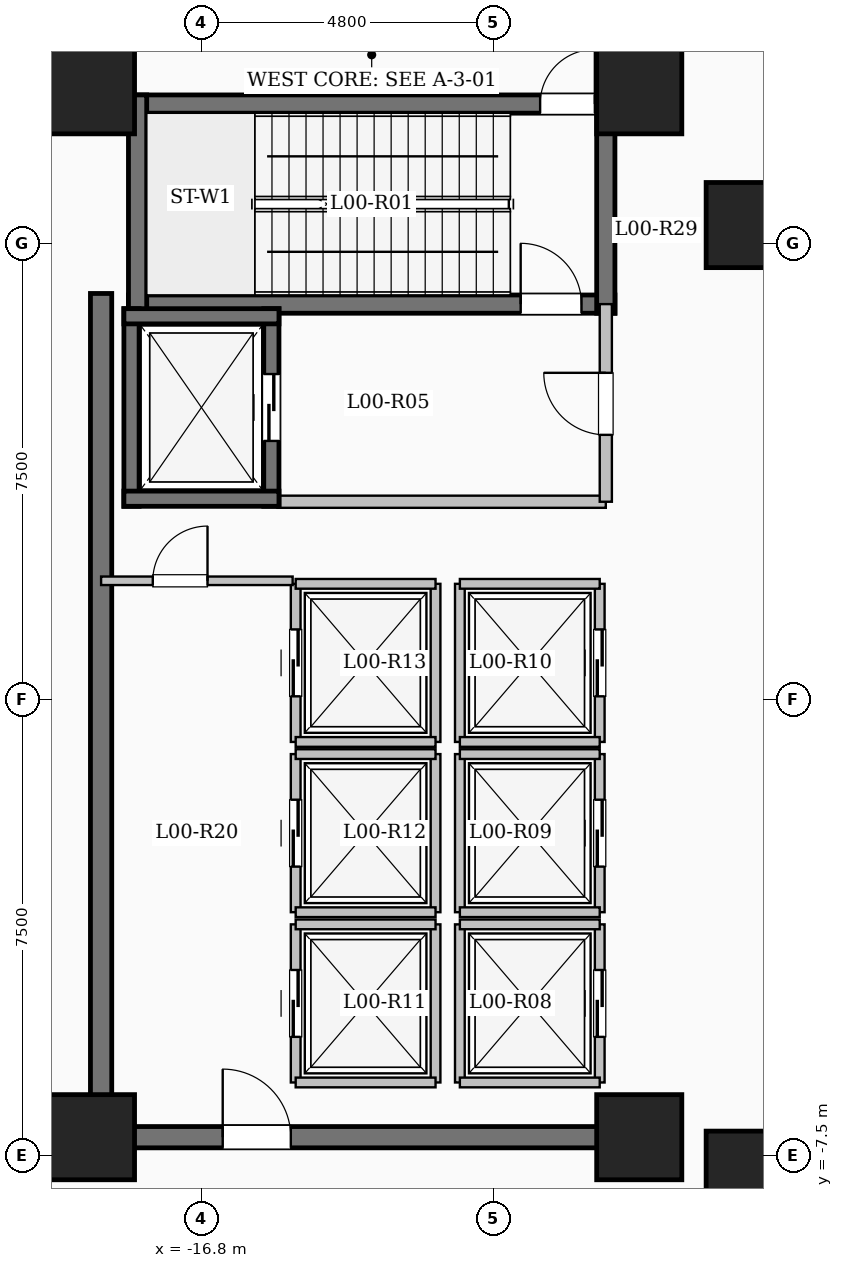
"""IFC4 building model, lengths in metres.
Left out: names, types, materials, properties, quantities, classifications, styles, units other than length and angle.
Written with IfcOpenShell. Run it as: python <this file> out.ifc"""

import sys

from ifc_helpers import new_model, si_unit, direction, frame, frame_2d, origin, origin_2d, place, context, subcontext, project, spatial, rectangle, extrude, element, fill, save


model = new_model("IFC4")
c1 = context("Model", 3, precision=1e-05, world=origin(), true_north=direction((0.0, 1.0)))
c2 = subcontext(c1, "Body", "Model", "MODEL_VIEW")
j1 = project(units=[si_unit("LENGTHUNIT", "METRE"), si_unit("PLANEANGLEUNIT", "RADIAN")], contexts=[c1])
p1 = place(None, origin())
s1 = spatial("IfcSite", under=j1, at=p1, CompositionType="ELEMENT")
p2 = place(p1, origin())
s2 = spatial("IfcBuilding", under=s1, at=p2, CompositionType="ELEMENT")
p3 = place(p2, origin())
s3 = spatial("IfcBuildingStorey", under=s2, at=p3, CompositionType="ELEMENT", Elevation=0.0)
for number, where, z_axis, x_axis in (
    (1, (-7.8, -7.8, 0.0), (0.0, 0.0, 1.0), (1.0, 0.0, 0.0)),
    (2, (-7.8, 7.8, 0.0), (0.0, 0.0, 1.0), (1.0, 0.0, 0.0)),
    (3, (-9.6, -7.2, 0.0), (0.0, 0.0, 1.0), (1.0, 0.0, 0.0)),
    (4, (-9.6, 10.0, 0.0), (0.0, 0.0, 1.0), (1.0, 0.0, 0.0)),
    (5, (-18.6, -7.2, 0.0), (0.0, 0.0, 1.0), (1.0, 0.0, 0.0)),
    (6, (-18.6, 10.0, 0.0), (0.0, 0.0, 1.0), (1.0, 0.0, 0.0)),
):
    element("IfcColumn", number, at=place(p3, frame(where, z_axis=z_axis, x_axis=x_axis)), inside=s3, PredefinedType="COLUMN", context=c2, shape_type="SweptSolid", body=[
        extrude(rectangle(XDim=1.4, YDim=1.4, at=origin_2d()), origin(), (0.0, 0.0, 1.0), 5.4),
    ])
p4 = place(p3, frame((-18.0, 9.79, 0.0), z_axis=(0.0, 0.0, 1.0), x_axis=(1.0, 0.0, 0.0)))
e7 = element("IfcWall", 7, at=p4, inside=s3, PredefinedType="SHEAR", context=c2, shape_type="SweptSolid", body=[
    extrude(rectangle(XDim=8.0, YDim=0.3, at=frame_2d((4.0, 0.0))), origin(), (0.0, 0.0, 1.0), 5.4),
])
p5 = place(p4, frame((6.77, 0.0, 0.0)))
e8 = element("IfcOpeningElement", 8, at=p5, cuts=e7, PredefinedType="OPENING", context=c2, shape_type="SweptSolid", body=[
    extrude(rectangle(XDim=0.9, YDim=2.15, at=frame_2d((0.45, 1.075))), frame((0.0, 0.16, 0.0), z_axis=(0.0, -1.0, 0.0), x_axis=(1.0, 0.0, 0.0)), (0.0, 0.0, 1.0), 0.32),
])
p6 = place(p3, frame((-18.0, 6.5, 0.0), z_axis=(0.0, 0.0, 1.0), x_axis=(1.0, 0.0, 0.0)))
e9 = element("IfcWall", 9, at=p6, inside=s3, PredefinedType="SHEAR", context=c2, shape_type="SweptSolid", body=[
    extrude(rectangle(XDim=8.0, YDim=0.3, at=frame_2d((4.0, 0.0))), origin(), (0.0, 0.0, 1.0), 5.4),
])
p7 = place(p6, frame((6.45, 0.0, 0.0)))
e10 = element("IfcOpeningElement", 10, at=p7, cuts=e9, PredefinedType="OPENING", context=c2, shape_type="SweptSolid", body=[
    extrude(rectangle(XDim=1.0, YDim=2.15, at=frame_2d((0.5, 1.075))), frame((0.0, 0.16, 0.0), z_axis=(0.0, -1.0, 0.0), x_axis=(1.0, 0.0, 0.0)), (0.0, 0.0, 1.0), 0.32),
])
for number, where, z_axis, x_axis in (
    (11, (-17.85, 6.35, 0.0), (0.0, 0.0, 1.0), (0.0, 1.0, 0.0)),
    (12, (-10.15, 6.35, 0.0), (0.0, 0.0, 1.0), (0.0, 1.0, 0.0)),
):
    element("IfcWall", number, at=place(p3, frame(where, z_axis=z_axis, x_axis=x_axis)), inside=s3, PredefinedType="SHEAR", context=c2, shape_type="SweptSolid", body=[
        extrude(rectangle(XDim=3.59, YDim=0.3, at=frame_2d((1.795, 0.0))), origin(), (0.0, 0.0, 1.0), 5.4),
    ])
p8 = place(p3, frame((-15.55, 3.25, 0.0), z_axis=(0.0, 0.0, 1.0), x_axis=(1.0, 0.0, 0.0)))
e13 = element("IfcWall", 13, at=p8, inside=s3, PredefinedType="SOLIDWALL", context=c2, shape_type="SweptSolid", body=[
    extrude(rectangle(XDim=5.4, YDim=0.2, at=frame_2d((2.7, 0.0))), origin(), (0.0, 0.0, 1.0), 5.1),
])
p9 = place(p3, frame((-10.15, 3.25, 0.0), z_axis=(0.0, 0.0, 1.0), x_axis=(0.0, 1.0, 0.0)))
e14 = element("IfcWall", 14, at=p9, inside=s3, PredefinedType="SOLIDWALL", context=c2, shape_type="SweptSolid", body=[
    extrude(rectangle(XDim=3.25, YDim=0.2, at=frame_2d((1.625, 0.0))), origin(), (0.0, 0.0, 1.0), 5.1),
])
p10 = place(p9, frame((1.1, 0.0, 0.0)))
e15 = element("IfcOpeningElement", 15, at=p10, cuts=e14, PredefinedType="OPENING", context=c2, shape_type="SweptSolid", body=[
    extrude(rectangle(XDim=1.02, YDim=2.15, at=frame_2d((0.51, 1.075))), frame((0.0, 0.11, 0.0), z_axis=(0.0, -1.0, 0.0), x_axis=(1.0, 0.0, 0.0)), (0.0, 0.0, 1.0), 0.22),
])
p11 = place(p3, frame((-17.95, 3.175, 0.0), z_axis=(0.0, 0.0, 1.0), x_axis=(0.0, 1.0, 0.0)))
e16 = element("IfcWall", 16, at=p11, inside=s3, PredefinedType="SHEAR", context=c2, shape_type="SweptSolid", body=[
    extrude(rectangle(XDim=3.25, YDim=0.25, at=frame_2d((1.625, 0.0))), origin(), (0.0, 0.0, 1.0), 5.4),
])
p12 = place(p3, frame((-15.65, 3.175, 0.0), z_axis=(0.0, 0.0, 1.0), x_axis=(0.0, 1.0, 0.0)))
e17 = element("IfcWall", 17, at=p12, inside=s3, PredefinedType="SHEAR", context=c2, shape_type="SweptSolid", body=[
    extrude(rectangle(XDim=3.25, YDim=0.25, at=frame_2d((1.625, 0.0))), origin(), (0.0, 0.0, 1.0), 5.4),
])
p13 = place(p12, frame((1.075, 0.0, 0.0)))
e18 = element("IfcOpeningElement", 18, at=p13, cuts=e17, PredefinedType="OPENING", context=c2, shape_type="SweptSolid", body=[
    extrude(rectangle(XDim=1.1, YDim=2.15, at=frame_2d((0.55, 1.075))), frame((0.0, 0.135, 0.0), z_axis=(0.0, -1.0, 0.0), x_axis=(1.0, 0.0, 0.0)), (0.0, 0.0, 1.0), 0.27),
])
for number, where, z_axis, x_axis in (
    (19, (-18.075, 3.3, 0.0), (0.0, 0.0, 1.0), (1.0, 0.0, 0.0)),
    (20, (-18.075, 6.3, 0.0), (0.0, 0.0, 1.0), (1.0, 0.0, 0.0)),
):
    element("IfcWall", number, at=place(p3, frame(where, z_axis=z_axis, x_axis=x_axis)), inside=s3, PredefinedType="SHEAR", context=c2, shape_type="SweptSolid", body=[
        extrude(rectangle(XDim=2.55, YDim=0.25, at=frame_2d((1.275, 0.0))), origin(), (0.0, 0.0, 1.0), 5.4),
    ])
p14 = place(p3, frame((-12.55, -6.3, 0.0), z_axis=(0.0, 0.0, 1.0), x_axis=(0.0, 1.0, 0.0)))
e21 = element("IfcWall", 21, at=p14, inside=s3, PredefinedType="SOLIDWALL", context=c2, shape_type="SweptSolid", body=[
    extrude(rectangle(XDim=2.6, YDim=0.16, at=frame_2d((1.3, 0.0))), origin(), (0.0, 0.0, 1.0), 5.1),
])
p15 = place(p3, frame((-10.25, -6.3, 0.0), z_axis=(0.0, 0.0, 1.0), x_axis=(0.0, 1.0, 0.0)))
e22 = element("IfcWall", 22, at=p15, inside=s3, PredefinedType="SOLIDWALL", context=c2, shape_type="SweptSolid", body=[
    extrude(rectangle(XDim=2.6, YDim=0.16, at=frame_2d((1.3, 0.0))), origin(), (0.0, 0.0, 1.0), 5.1),
])
p16 = place(p15, frame((0.75, 0.0, 0.0)))
e23 = element("IfcOpeningElement", 23, at=p16, cuts=e22, PredefinedType="OPENING", context=c2, shape_type="SweptSolid", body=[
    extrude(rectangle(XDim=1.1, YDim=2.15, at=frame_2d((0.55, 1.075))), frame((0.0, 0.09, 0.0), z_axis=(0.0, -1.0, 0.0), x_axis=(1.0, 0.0, 0.0)), (0.0, 0.0, 1.0), 0.18),
])
for number, where, z_axis, x_axis in (
    (24, (-12.55, -6.3, 0.0), (0.0, 0.0, 1.0), (1.0, 0.0, 0.0)),
    (25, (-12.55, -3.7, 0.0), (0.0, 0.0, 1.0), (1.0, 0.0, 0.0)),
):
    element("IfcWall", number, at=place(p3, frame(where, z_axis=z_axis, x_axis=x_axis)), inside=s3, PredefinedType="SOLIDWALL", context=c2, shape_type="SweptSolid", body=[
        extrude(rectangle(XDim=2.3, YDim=0.16, at=frame_2d((1.15, 0.0))), origin(), (0.0, 0.0, 1.0), 5.1),
    ])
p17 = place(p3, frame((-12.55, -3.5, 0.0), z_axis=(0.0, 0.0, 1.0), x_axis=(0.0, 1.0, 0.0)))
e26 = element("IfcWall", 26, at=p17, inside=s3, PredefinedType="SOLIDWALL", context=c2, shape_type="SweptSolid", body=[
    extrude(rectangle(XDim=2.6, YDim=0.16, at=frame_2d((1.3, 0.0))), origin(), (0.0, 0.0, 1.0), 5.1),
])
p18 = place(p3, frame((-10.25, -3.5, 0.0), z_axis=(0.0, 0.0, 1.0), x_axis=(0.0, 1.0, 0.0)))
e27 = element("IfcWall", 27, at=p18, inside=s3, PredefinedType="SOLIDWALL", context=c2, shape_type="SweptSolid", body=[
    extrude(rectangle(XDim=2.6, YDim=0.16, at=frame_2d((1.3, 0.0))), origin(), (0.0, 0.0, 1.0), 5.1),
])
p19 = place(p18, frame((0.75, 0.0, 0.0)))
e28 = element("IfcOpeningElement", 28, at=p19, cuts=e27, PredefinedType="OPENING", context=c2, shape_type="SweptSolid", body=[
    extrude(rectangle(XDim=1.1, YDim=2.15, at=frame_2d((0.55, 1.075))), frame((0.0, 0.09, 0.0), z_axis=(0.0, -1.0, 0.0), x_axis=(1.0, 0.0, 0.0)), (0.0, 0.0, 1.0), 0.18),
])
for number, where, z_axis, x_axis in (
    (29, (-12.55, -3.5, 0.0), (0.0, 0.0, 1.0), (1.0, 0.0, 0.0)),
    (30, (-12.55, -0.9, 0.0), (0.0, 0.0, 1.0), (1.0, 0.0, 0.0)),
):
    element("IfcWall", number, at=place(p3, frame(where, z_axis=z_axis, x_axis=x_axis)), inside=s3, PredefinedType="SOLIDWALL", context=c2, shape_type="SweptSolid", body=[
        extrude(rectangle(XDim=2.3, YDim=0.16, at=frame_2d((1.15, 0.0))), origin(), (0.0, 0.0, 1.0), 5.1),
    ])
p20 = place(p3, frame((-12.55, -0.7, 0.0), z_axis=(0.0, 0.0, 1.0), x_axis=(0.0, 1.0, 0.0)))
e31 = element("IfcWall", 31, at=p20, inside=s3, PredefinedType="SOLIDWALL", context=c2, shape_type="SweptSolid", body=[
    extrude(rectangle(XDim=2.6, YDim=0.16, at=frame_2d((1.3, 0.0))), origin(), (0.0, 0.0, 1.0), 5.1),
])
p21 = place(p3, frame((-10.25, -0.7, 0.0), z_axis=(0.0, 0.0, 1.0), x_axis=(0.0, 1.0, 0.0)))
e32 = element("IfcWall", 32, at=p21, inside=s3, PredefinedType="SOLIDWALL", context=c2, shape_type="SweptSolid", body=[
    extrude(rectangle(XDim=2.6, YDim=0.16, at=frame_2d((1.3, 0.0))), origin(), (0.0, 0.0, 1.0), 5.1),
])
p22 = place(p21, frame((0.75, 0.0, 0.0)))
e33 = element("IfcOpeningElement", 33, at=p22, cuts=e32, PredefinedType="OPENING", context=c2, shape_type="SweptSolid", body=[
    extrude(rectangle(XDim=1.1, YDim=2.15, at=frame_2d((0.55, 1.075))), frame((0.0, 0.09, 0.0), z_axis=(0.0, -1.0, 0.0), x_axis=(1.0, 0.0, 0.0)), (0.0, 0.0, 1.0), 0.18),
])
for number, where, z_axis, x_axis in (
    (34, (-12.55, -0.7, 0.0), (0.0, 0.0, 1.0), (1.0, 0.0, 0.0)),
    (35, (-12.55, 1.9, 0.0), (0.0, 0.0, 1.0), (1.0, 0.0, 0.0)),
):
    element("IfcWall", number, at=place(p3, frame(where, z_axis=z_axis, x_axis=x_axis)), inside=s3, PredefinedType="SOLIDWALL", context=c2, shape_type="SweptSolid", body=[
        extrude(rectangle(XDim=2.3, YDim=0.16, at=frame_2d((1.15, 0.0))), origin(), (0.0, 0.0, 1.0), 5.1),
    ])
p23 = place(p3, frame((-15.25, -6.3, 0.0), z_axis=(0.0, 0.0, 1.0), x_axis=(0.0, 1.0, 0.0)))
e36 = element("IfcWall", 36, at=p23, inside=s3, PredefinedType="SOLIDWALL", context=c2, shape_type="SweptSolid", body=[
    extrude(rectangle(XDim=2.6, YDim=0.16, at=frame_2d((1.3, 0.0))), origin(), (0.0, 0.0, 1.0), 5.1),
])
p24 = place(p23, frame((0.75, 0.0, 0.0)))
e37 = element("IfcOpeningElement", 37, at=p24, cuts=e36, PredefinedType="OPENING", context=c2, shape_type="SweptSolid", body=[
    extrude(rectangle(XDim=1.1, YDim=2.15, at=frame_2d((0.55, 1.075))), frame((0.0, 0.09, 0.0), z_axis=(0.0, -1.0, 0.0), x_axis=(1.0, 0.0, 0.0)), (0.0, 0.0, 1.0), 0.18),
])
p25 = place(p3, frame((-12.95, -6.3, 0.0), z_axis=(0.0, 0.0, 1.0), x_axis=(0.0, 1.0, 0.0)))
e38 = element("IfcWall", 38, at=p25, inside=s3, PredefinedType="SOLIDWALL", context=c2, shape_type="SweptSolid", body=[
    extrude(rectangle(XDim=2.6, YDim=0.16, at=frame_2d((1.3, 0.0))), origin(), (0.0, 0.0, 1.0), 5.1),
])
for number, where, z_axis, x_axis in (
    (39, (-15.25, -6.3, 0.0), (0.0, 0.0, 1.0), (1.0, 0.0, 0.0)),
    (40, (-15.25, -3.7, 0.0), (0.0, 0.0, 1.0), (1.0, 0.0, 0.0)),
):
    element("IfcWall", number, at=place(p3, frame(where, z_axis=z_axis, x_axis=x_axis)), inside=s3, PredefinedType="SOLIDWALL", context=c2, shape_type="SweptSolid", body=[
        extrude(rectangle(XDim=2.3, YDim=0.16, at=frame_2d((1.15, 0.0))), origin(), (0.0, 0.0, 1.0), 5.1),
    ])
p26 = place(p3, frame((-15.25, -3.5, 0.0), z_axis=(0.0, 0.0, 1.0), x_axis=(0.0, 1.0, 0.0)))
e41 = element("IfcWall", 41, at=p26, inside=s3, PredefinedType="SOLIDWALL", context=c2, shape_type="SweptSolid", body=[
    extrude(rectangle(XDim=2.6, YDim=0.16, at=frame_2d((1.3, 0.0))), origin(), (0.0, 0.0, 1.0), 5.1),
])
p27 = place(p26, frame((0.75, 0.0, 0.0)))
e42 = element("IfcOpeningElement", 42, at=p27, cuts=e41, PredefinedType="OPENING", context=c2, shape_type="SweptSolid", body=[
    extrude(rectangle(XDim=1.1, YDim=2.15, at=frame_2d((0.55, 1.075))), frame((0.0, 0.09, 0.0), z_axis=(0.0, -1.0, 0.0), x_axis=(1.0, 0.0, 0.0)), (0.0, 0.0, 1.0), 0.18),
])
p28 = place(p3, frame((-12.95, -3.5, 0.0), z_axis=(0.0, 0.0, 1.0), x_axis=(0.0, 1.0, 0.0)))
e43 = element("IfcWall", 43, at=p28, inside=s3, PredefinedType="SOLIDWALL", context=c2, shape_type="SweptSolid", body=[
    extrude(rectangle(XDim=2.6, YDim=0.16, at=frame_2d((1.3, 0.0))), origin(), (0.0, 0.0, 1.0), 5.1),
])
for number, where, z_axis, x_axis in (
    (44, (-15.25, -3.5, 0.0), (0.0, 0.0, 1.0), (1.0, 0.0, 0.0)),
    (45, (-15.25, -0.9, 0.0), (0.0, 0.0, 1.0), (1.0, 0.0, 0.0)),
):
    element("IfcWall", number, at=place(p3, frame(where, z_axis=z_axis, x_axis=x_axis)), inside=s3, PredefinedType="SOLIDWALL", context=c2, shape_type="SweptSolid", body=[
        extrude(rectangle(XDim=2.3, YDim=0.16, at=frame_2d((1.15, 0.0))), origin(), (0.0, 0.0, 1.0), 5.1),
    ])
p29 = place(p3, frame((-15.25, -0.7, 0.0), z_axis=(0.0, 0.0, 1.0), x_axis=(0.0, 1.0, 0.0)))
e46 = element("IfcWall", 46, at=p29, inside=s3, PredefinedType="SOLIDWALL", context=c2, shape_type="SweptSolid", body=[
    extrude(rectangle(XDim=2.6, YDim=0.16, at=frame_2d((1.3, 0.0))), origin(), (0.0, 0.0, 1.0), 5.1),
])
p30 = place(p29, frame((0.75, 0.0, 0.0)))
e47 = element("IfcOpeningElement", 47, at=p30, cuts=e46, PredefinedType="OPENING", context=c2, shape_type="SweptSolid", body=[
    extrude(rectangle(XDim=1.1, YDim=2.15, at=frame_2d((0.55, 1.075))), frame((0.0, 0.09, 0.0), z_axis=(0.0, -1.0, 0.0), x_axis=(1.0, 0.0, 0.0)), (0.0, 0.0, 1.0), 0.18),
])
p31 = place(p3, frame((-12.95, -0.7, 0.0), z_axis=(0.0, 0.0, 1.0), x_axis=(0.0, 1.0, 0.0)))
e48 = element("IfcWall", 48, at=p31, inside=s3, PredefinedType="SOLIDWALL", context=c2, shape_type="SweptSolid", body=[
    extrude(rectangle(XDim=2.6, YDim=0.16, at=frame_2d((1.3, 0.0))), origin(), (0.0, 0.0, 1.0), 5.1),
])
for number, where, z_axis, x_axis in (
    (49, (-15.25, -0.7, 0.0), (0.0, 0.0, 1.0), (1.0, 0.0, 0.0)),
    (50, (-15.25, 1.9, 0.0), (0.0, 0.0, 1.0), (1.0, 0.0, 0.0)),
):
    element("IfcWall", number, at=place(p3, frame(where, z_axis=z_axis, x_axis=x_axis)), inside=s3, PredefinedType="SOLIDWALL", context=c2, shape_type="SweptSolid", body=[
        extrude(rectangle(XDim=2.3, YDim=0.16, at=frame_2d((1.15, 0.0))), origin(), (0.0, 0.0, 1.0), 5.1),
    ])
p32 = place(p3, frame((-18.45, -7.375, 0.0), z_axis=(0.0, 0.0, 1.0), x_axis=(0.0, 1.0, 0.0)))
e51 = element("IfcWall", 51, at=p32, inside=s3, PredefinedType="SHEAR", context=c2, shape_type="SweptSolid", body=[
    extrude(rectangle(XDim=14.05, YDim=0.35, at=frame_2d((7.025, 0.0))), origin(), (0.0, 0.0, 1.0), 5.4),
])
p33 = place(p3, frame((-18.625, -7.2, 0.0), z_axis=(0.0, 0.0, 1.0), x_axis=(1.0, 0.0, 0.0)))
e52 = element("IfcWall", 52, at=p33, inside=s3, PredefinedType="SHEAR", context=c2, shape_type="SweptSolid", body=[
    extrude(rectangle(XDim=8.55, YDim=0.35, at=frame_2d((4.275, 0.0))), origin(), (0.0, 0.0, 1.0), 5.4),
])
p34 = place(p33, frame((2.175, 0.0, 0.0)))
e53 = element("IfcOpeningElement", 53, at=p34, cuts=e52, PredefinedType="OPENING", context=c2, shape_type="SweptSolid", body=[
    extrude(rectangle(XDim=1.12, YDim=2.15, at=frame_2d((0.56, 1.075))), frame((0.0, 0.185, 0.0), z_axis=(0.0, -1.0, 0.0), x_axis=(1.0, 0.0, 0.0)), (0.0, 0.0, 1.0), 0.37),
])
p35 = place(p3, frame((-18.45, 1.95, 0.0), z_axis=(0.0, 0.0, 1.0), x_axis=(1.0, 0.0, 0.0)))
e54 = element("IfcWall", 54, at=p35, inside=s3, PredefinedType="PARTITIONING", context=c2, shape_type="SweptSolid", body=[
    extrude(rectangle(XDim=3.15, YDim=0.14, at=frame_2d((1.575, 0.0))), origin(), (0.0, 0.0, 1.0), 5.1),
])
p36 = place(p35, frame((0.85, 0.0, 0.0)))
e55 = element("IfcOpeningElement", 55, at=p36, cuts=e54, PredefinedType="OPENING", context=c2, shape_type="SweptSolid", body=[
    extrude(rectangle(XDim=0.9, YDim=2.08, at=frame_2d((0.45, 1.04))), frame((0.0, 0.08, 0.0), z_axis=(0.0, -1.0, 0.0), x_axis=(1.0, 0.0, 0.0)), (0.0, 0.0, 1.0), 0.16),
])
p37 = place(p7, origin())
e56 = element("IfcDoor", 56, at=p37, inside=s3, OperationType="SINGLE_SWING_LEFT", PredefinedType="DOOR", context=c2, shape_type="SweptSolid", body=[
    extrude(rectangle(XDim=1.0, YDim=2.15, at=frame_2d((0.5, 1.075))), frame((0.0, 0.025, 0.0), z_axis=(0.0, -1.0, 0.0), x_axis=(1.0, 0.0, 0.0)), (0.0, 0.0, 1.0), 0.05),
])
fill(e10, e56)
p38 = place(p5, origin())
e57 = element("IfcDoor", 57, at=p38, inside=s3, OperationType="SINGLE_SWING_RIGHT", PredefinedType="DOOR", context=c2, shape_type="SweptSolid", body=[
    extrude(rectangle(XDim=0.9, YDim=2.15, at=frame_2d((0.45, 1.075))), frame((0.0, 0.025, 0.0), z_axis=(0.0, -1.0, 0.0), x_axis=(1.0, 0.0, 0.0)), (0.0, 0.0, 1.0), 0.05),
])
fill(e8, e57)
p39 = place(p10, origin())
e58 = element("IfcDoor", 58, at=p39, inside=s3, OperationType="SINGLE_SWING_RIGHT", PredefinedType="DOOR", context=c2, shape_type="SweptSolid", body=[
    extrude(rectangle(XDim=1.02, YDim=2.15, at=frame_2d((0.51, 1.075))), frame((0.0, 0.025, 0.0), z_axis=(0.0, -1.0, 0.0), x_axis=(1.0, 0.0, 0.0)), (0.0, 0.0, 1.0), 0.05),
])
fill(e15, e58)
p40 = place(p13, origin())
e59 = element("IfcDoor", 59, at=p40, inside=s3, OperationType="SLIDING_TO_LEFT", PredefinedType="DOOR", context=c2, shape_type="SweptSolid", body=[
    extrude(rectangle(XDim=1.1, YDim=2.15, at=frame_2d((0.55, 1.075))), frame((0.0, 0.025, 0.0), z_axis=(0.0, -1.0, 0.0), x_axis=(1.0, 0.0, 0.0)), (0.0, 0.0, 1.0), 0.05),
])
fill(e18, e59)
p41 = place(p16, origin())
e60 = element("IfcDoor", 60, at=p41, inside=s3, OperationType="SLIDING_TO_LEFT", PredefinedType="DOOR", context=c2, shape_type="SweptSolid", body=[
    extrude(rectangle(XDim=1.1, YDim=2.15, at=frame_2d((0.55, 1.075))), frame((0.0, 0.025, 0.0), z_axis=(0.0, -1.0, 0.0), x_axis=(1.0, 0.0, 0.0)), (0.0, 0.0, 1.0), 0.05),
])
fill(e23, e60)
p42 = place(p19, origin())
e61 = element("IfcDoor", 61, at=p42, inside=s3, OperationType="SLIDING_TO_LEFT", PredefinedType="DOOR", context=c2, shape_type="SweptSolid", body=[
    extrude(rectangle(XDim=1.1, YDim=2.15, at=frame_2d((0.55, 1.075))), frame((0.0, 0.025, 0.0), z_axis=(0.0, -1.0, 0.0), x_axis=(1.0, 0.0, 0.0)), (0.0, 0.0, 1.0), 0.05),
])
fill(e28, e61)
p43 = place(p22, origin())
e62 = element("IfcDoor", 62, at=p43, inside=s3, OperationType="SLIDING_TO_LEFT", PredefinedType="DOOR", context=c2, shape_type="SweptSolid", body=[
    extrude(rectangle(XDim=1.1, YDim=2.15, at=frame_2d((0.55, 1.075))), frame((0.0, 0.025, 0.0), z_axis=(0.0, -1.0, 0.0), x_axis=(1.0, 0.0, 0.0)), (0.0, 0.0, 1.0), 0.05),
])
fill(e33, e62)
p44 = place(p24, origin())
e63 = element("IfcDoor", 63, at=p44, inside=s3, OperationType="SLIDING_TO_LEFT", PredefinedType="DOOR", context=c2, shape_type="SweptSolid", body=[
    extrude(rectangle(XDim=1.1, YDim=2.15, at=frame_2d((0.55, 1.075))), frame((0.0, 0.025, 0.0), z_axis=(0.0, -1.0, 0.0), x_axis=(1.0, 0.0, 0.0)), (0.0, 0.0, 1.0), 0.05),
])
fill(e37, e63)
p45 = place(p27, origin())
e64 = element("IfcDoor", 64, at=p45, inside=s3, OperationType="SLIDING_TO_LEFT", PredefinedType="DOOR", context=c2, shape_type="SweptSolid", body=[
    extrude(rectangle(XDim=1.1, YDim=2.15, at=frame_2d((0.55, 1.075))), frame((0.0, 0.025, 0.0), z_axis=(0.0, -1.0, 0.0), x_axis=(1.0, 0.0, 0.0)), (0.0, 0.0, 1.0), 0.05),
])
fill(e42, e64)
p46 = place(p30, origin())
e65 = element("IfcDoor", 65, at=p46, inside=s3, OperationType="SLIDING_TO_LEFT", PredefinedType="DOOR", context=c2, shape_type="SweptSolid", body=[
    extrude(rectangle(XDim=1.1, YDim=2.15, at=frame_2d((0.55, 1.075))), frame((0.0, 0.025, 0.0), z_axis=(0.0, -1.0, 0.0), x_axis=(1.0, 0.0, 0.0)), (0.0, 0.0, 1.0), 0.05),
])
fill(e47, e65)
p47 = place(p34, origin())
e66 = element("IfcDoor", 66, at=p47, inside=s3, OperationType="SINGLE_SWING_LEFT", PredefinedType="DOOR", context=c2, shape_type="SweptSolid", body=[
    extrude(rectangle(XDim=1.12, YDim=2.15, at=frame_2d((0.56, 1.075))), frame((0.0, 0.025, 0.0), z_axis=(0.0, -1.0, 0.0), x_axis=(1.0, 0.0, 0.0)), (0.0, 0.0, 1.0), 0.05),
])
fill(e53, e66)
p48 = place(p36, origin())
e67 = element("IfcDoor", 67, at=p48, inside=s3, OperationType="SINGLE_SWING_RIGHT", PredefinedType="DOOR", context=c2, shape_type="SweptSolid", body=[
    extrude(rectangle(XDim=0.9, YDim=2.08, at=frame_2d((0.45, 1.04))), frame((0.0, 0.025, 0.0), z_axis=(0.0, -1.0, 0.0), x_axis=(1.0, 0.0, 0.0)), (0.0, 0.0, 1.0), 0.05),
])
fill(e55, e67)
save(model, sys.argv[1])
